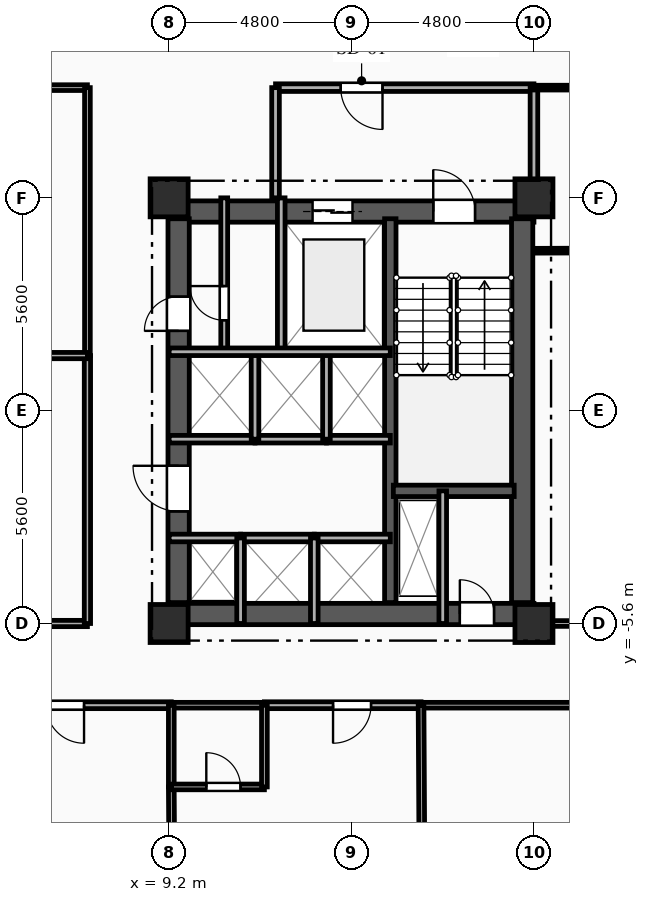
"""IFC4 building model, lengths in metres.
Left out: names, types, materials, properties, quantities, classifications, styles, units other than length and angle.
Written with IfcOpenShell. Run it as: python <this file> out.ifc"""

import sys

from ifc_helpers import new_model, si_unit, direction, frame, frame_2d, origin, origin_2d, place, context, subcontext, project, spatial, rectangle, extrude, element, fill, save


model = new_model("IFC4")
c1 = context("Model", 3, precision=1e-05, world=origin(), true_north=direction((0.0, 1.0)))
c2 = subcontext(c1, "Body", "Model", "MODEL_VIEW")
j1 = project(units=[si_unit("LENGTHUNIT", "METRE"), si_unit("PLANEANGLEUNIT", "RADIAN")], contexts=[c1])
p1 = place(None, origin())
s1 = spatial("IfcSite", under=j1, at=p1, CompositionType="ELEMENT")
p2 = place(p1, origin())
s2 = spatial("IfcBuilding", under=s1, at=p2, CompositionType="ELEMENT")
p3 = place(p2, frame((0.0, 0.0, 115.85)))
s3 = spatial("IfcBuildingStorey", under=s2, at=p3, CompositionType="ELEMENT", Elevation=115.85)
for number, where, z_axis, x_axis in (
    (1, (9.2, -5.6, 0.0), (0.0, 0.0, 1.0), (1.0, 0.0, 0.0)),
    (2, (9.2, 5.6, 0.0), (0.0, 0.0, 1.0), (1.0, 0.0, 0.0)),
    (3, (18.8, -5.6, 0.0), (0.0, 0.0, 1.0), (1.0, 0.0, 0.0)),
    (4, (18.8, 5.6, 0.0), (0.0, 0.0, 1.0), (1.0, 0.0, 0.0)),
):
    element("IfcColumn", number, at=place(p3, frame(where, z_axis=z_axis, x_axis=x_axis)), inside=s3, PredefinedType="COLUMN", context=c2, shape_type="SweptSolid", body=[
        extrude(rectangle(XDim=1.0, YDim=1.0, at=origin_2d()), origin(), (0.0, 0.0, 1.0), 3.35),
    ])
p4 = place(p3, frame((9.2, 5.24, 0.0), z_axis=(0.0, 0.0, 1.0), x_axis=(1.0, 0.0, 0.0)))
e5 = element("IfcWall", 5, at=p4, inside=s3, PredefinedType="SHEAR", context=c2, shape_type="SweptSolid", body=[
    extrude(rectangle(XDim=9.6, YDim=0.56, at=frame_2d((4.8, 0.0))), origin(), (0.0, 0.0, 1.0), 3.045),
])
p5 = place(p4, frame((6.95, 0.0, 0.0)))
e6 = element("IfcOpeningElement", 6, at=p5, cuts=e5, PredefinedType="OPENING", context=c2, shape_type="SweptSolid", body=[
    extrude(rectangle(XDim=1.1, YDim=2.15, at=frame_2d((0.55, 1.075))), frame((0.0, 0.29, 0.0), z_axis=(0.0, -1.0, 0.0), x_axis=(1.0, 0.0, 0.0)), (0.0, 0.0, 1.0), 0.58),
])
p6 = place(p4, frame((3.775, 0.0, 0.0)))
e7 = element("IfcOpeningElement", 7, at=p6, cuts=e5, PredefinedType="OPENING", context=c2, shape_type="SweptSolid", body=[
    extrude(rectangle(XDim=1.05, YDim=2.1, at=frame_2d((0.525, 1.05))), frame((0.0, 0.29, 0.0), z_axis=(0.0, -1.0, 0.0), x_axis=(1.0, 0.0, 0.0)), (0.0, 0.0, 1.0), 0.58),
])
p7 = place(p3, frame((9.2, -5.35, 0.0), z_axis=(0.0, 0.0, 1.0), x_axis=(1.0, 0.0, 0.0)))
e8 = element("IfcWall", 8, at=p7, inside=s3, PredefinedType="SHEAR", context=c2, shape_type="SweptSolid", body=[
    extrude(rectangle(XDim=9.6, YDim=0.56, at=frame_2d((4.8, 0.0))), origin(), (0.0, 0.0, 1.0), 3.045),
])
p8 = place(p7, frame((7.65, 0.0, 0.0)))
e9 = element("IfcOpeningElement", 9, at=p8, cuts=e8, PredefinedType="OPENING", context=c2, shape_type="SweptSolid", body=[
    extrude(rectangle(XDim=0.9, YDim=2.1, at=frame_2d((0.45, 1.05))), frame((0.0, 0.29, 0.0), z_axis=(0.0, -1.0, 0.0), x_axis=(1.0, 0.0, 0.0)), (0.0, 0.0, 1.0), 0.58),
])
p9 = place(p3, frame((9.45, -5.05, 0.0), z_axis=(0.0, 0.0, 1.0), x_axis=(0.0, 1.0, 0.0)))
e10 = element("IfcWall", 10, at=p9, inside=s3, PredefinedType="SHEAR", context=c2, shape_type="SweptSolid", body=[
    extrude(rectangle(XDim=10.1, YDim=0.56, at=frame_2d((5.05, 0.0))), origin(), (0.0, 0.0, 1.0), 3.045),
])
p10 = place(p9, frame((7.15, 0.0, 0.0)))
e11 = element("IfcOpeningElement", 11, at=p10, cuts=e10, PredefinedType="OPENING", context=c2, shape_type="SweptSolid", body=[
    extrude(rectangle(XDim=0.9, YDim=2.1, at=frame_2d((0.45, 1.05))), frame((0.0, 0.29, 0.0), z_axis=(0.0, -1.0, 0.0), x_axis=(1.0, 0.0, 0.0)), (0.0, 0.0, 1.0), 0.58),
])
p11 = place(p9, frame((2.4, 0.0, 0.0)))
e12 = element("IfcOpeningElement", 12, at=p11, cuts=e10, PredefinedType="OPENING", context=c2, shape_type="SweptSolid", body=[
    extrude(rectangle(XDim=1.2, YDim=2.15, at=frame_2d((0.6, 1.075))), frame((0.0, 0.29, 0.0), z_axis=(0.0, -1.0, 0.0), x_axis=(1.0, 0.0, 0.0)), (0.0, 0.0, 1.0), 0.58),
])
p12 = place(p3, frame((18.49, -5.05, 0.0), z_axis=(0.0, 0.0, 1.0), x_axis=(0.0, 1.0, 0.0)))
e13 = element("IfcWall", 13, at=p12, inside=s3, PredefinedType="SHEAR", context=c2, shape_type="SweptSolid", body=[
    extrude(rectangle(XDim=10.1, YDim=0.56, at=frame_2d((5.05, 0.0))), origin(), (0.0, 0.0, 1.0), 3.045),
])
p13 = place(p3, frame((15.02, -5.05, 0.0), z_axis=(0.0, 0.0, 1.0), x_axis=(0.0, 1.0, 0.0)))
e14 = element("IfcWall", 14, at=p13, inside=s3, PredefinedType="SHEAR", context=c2, shape_type="SweptSolid", body=[
    extrude(rectangle(XDim=10.1, YDim=0.3, at=frame_2d((5.05, 0.0))), origin(), (0.0, 0.0, 1.0), 3.045),
])
p14 = place(p3, frame((15.1, -2.11, 0.0), z_axis=(0.0, 0.0, 1.0), x_axis=(1.0, 0.0, 0.0)))
e15 = element("IfcWall", 15, at=p14, inside=s3, PredefinedType="SHEAR", context=c2, shape_type="SweptSolid", body=[
    extrude(rectangle(XDim=3.18, YDim=0.3, at=frame_2d((1.59, 0.0))), origin(), (0.0, 0.0, 1.0), 3.045),
])
p15 = place(p3, frame((16.4, -2.11, 0.0), z_axis=(0.0, 0.0, 1.0), x_axis=(0.0, -1.0, 0.0)))
e16 = element("IfcWall", 16, at=p15, inside=s3, PredefinedType="PARTITIONING", context=c2, shape_type="SweptSolid", body=[
    extrude(rectangle(XDim=3.49, YDim=0.2, at=frame_2d((1.745, 0.0))), origin(), (0.0, 0.0, 1.0), 3.045),
])
p16 = place(p3, frame((12.15, 5.6, 0.0), z_axis=(0.0, 0.0, 1.0), x_axis=(0.0, -1.0, 0.0)))
e17 = element("IfcWall", 17, at=p16, inside=s3, PredefinedType="PARTITIONING", context=c2, shape_type="SweptSolid", body=[
    extrude(rectangle(XDim=4.05, YDim=0.2, at=frame_2d((2.025, 0.0))), origin(), (0.0, 0.0, 1.0), 3.045),
])
p17 = place(p3, frame((18.8, 8.5, 0.0), z_axis=(0.0, 0.0, 1.0), x_axis=(-1.0, 0.0, 0.0)))
e18 = element("IfcWall", 18, at=p17, inside=s3, PredefinedType="PARTITIONING", context=c2, shape_type="SweptSolid", body=[
    extrude(rectangle(XDim=6.8, YDim=0.2, at=frame_2d((3.4, 0.0))), origin(), (0.0, 0.0, 1.0), 3.045),
])
p18 = place(p17, frame((3.985, 0.0, 0.0)))
e19 = element("IfcOpeningElement", 19, at=p18, cuts=e18, PredefinedType="OPENING", context=c2, shape_type="SweptSolid", body=[
    extrude(rectangle(XDim=1.1, YDim=2.15, at=frame_2d((0.55, 1.075))), frame((0.0, 0.11, 0.0), z_axis=(0.0, -1.0, 0.0), x_axis=(1.0, 0.0, 0.0)), (0.0, 0.0, 1.0), 0.22),
])
p19 = place(p3, frame((12.0, 8.5, 0.0), z_axis=(0.0, 0.0, 1.0), x_axis=(0.0, -1.0, 0.0)))
e20 = element("IfcWall", 20, at=p19, inside=s3, PredefinedType="PARTITIONING", context=c2, shape_type="SweptSolid", body=[
    extrude(rectangle(XDim=2.9, YDim=0.2, at=frame_2d((1.45, 0.0))), origin(), (0.0, 0.0, 1.0), 3.045),
])
p20 = place(p3, frame((18.8, 5.6, 0.0), z_axis=(0.0, 0.0, 1.0), x_axis=(0.0, 1.0, 0.0)))
e21 = element("IfcWall", 21, at=p20, inside=s3, PredefinedType="PARTITIONING", context=c2, shape_type="SweptSolid", body=[
    extrude(rectangle(XDim=2.9, YDim=0.2, at=frame_2d((1.45, 0.0))), origin(), (0.0, 0.0, 1.0), 2.53),
])
p21 = place(p3, frame((10.65, 1.55, 0.0), z_axis=(0.0, 0.0, 1.0), x_axis=(0.0, 1.0, 0.0)))
e22 = element("IfcWall", 22, at=p21, inside=s3, PredefinedType="PARTITIONING", context=c2, shape_type="SweptSolid", body=[
    extrude(rectangle(XDim=4.05, YDim=0.18, at=frame_2d((2.025, 0.0))), origin(), (0.0, 0.0, 1.0), 3.045),
])
p22 = place(p21, frame((0.829, 0.0, 0.0)))
e23 = element("IfcOpeningElement", 23, at=p22, cuts=e22, PredefinedType="OPENING", context=c2, shape_type="SweptSolid", body=[
    extrude(rectangle(XDim=0.9, YDim=2.1, at=frame_2d((0.45, 1.05))), frame((0.0, 0.1, 0.0), z_axis=(0.0, -1.0, 0.0), x_axis=(1.0, 0.0, 0.0)), (0.0, 0.0, 1.0), 0.2),
])
p23 = place(p3, frame((9.2, -3.35, 0.0), z_axis=(0.0, 0.0, 1.0), x_axis=(1.0, 0.0, 0.0)))
e24 = element("IfcWall", 24, at=p23, inside=s3, PredefinedType="PARTITIONING", context=c2, shape_type="SweptSolid", body=[
    extrude(rectangle(XDim=1.88, YDim=0.2, at=frame_2d((0.94, 0.0))), origin(), (0.0, 0.0, 1.0), 2.76),
])
p24 = place(p3, frame((11.08, -3.35, 0.0), z_axis=(0.0, 0.0, 1.0), x_axis=(1.0, 0.0, 0.0)))
e25 = element("IfcWall", 25, at=p24, inside=s3, PredefinedType="PARTITIONING", context=c2, shape_type="SweptSolid", body=[
    extrude(rectangle(XDim=1.94, YDim=0.2, at=frame_2d((0.97, 0.0))), origin(), (0.0, 0.0, 1.0), 3.045),
])
p25 = place(p3, frame((13.02, -3.35, 0.0), z_axis=(0.0, 0.0, 1.0), x_axis=(1.0, 0.0, 0.0)))
e26 = element("IfcWall", 26, at=p25, inside=s3, PredefinedType="PARTITIONING", context=c2, shape_type="SweptSolid", body=[
    extrude(rectangle(XDim=2.0, YDim=0.2, at=frame_2d((1.0, 0.0))), origin(), (0.0, 0.0, 1.0), 3.045),
])
p26 = place(p3, frame((11.46, -0.75, 0.0), z_axis=(0.0, 0.0, 1.0), x_axis=(-1.0, 0.0, 0.0)))
e27 = element("IfcWall", 27, at=p26, inside=s3, PredefinedType="PARTITIONING", context=c2, shape_type="SweptSolid", body=[
    extrude(rectangle(XDim=2.26, YDim=0.2, at=frame_2d((1.13, 0.0))), origin(), (0.0, 0.0, 1.0), 3.045),
])
p27 = place(p3, frame((13.34, -0.75, 0.0), z_axis=(0.0, 0.0, 1.0), x_axis=(-1.0, 0.0, 0.0)))
e28 = element("IfcWall", 28, at=p27, inside=s3, PredefinedType="PARTITIONING", context=c2, shape_type="SweptSolid", body=[
    extrude(rectangle(XDim=1.88, YDim=0.2, at=frame_2d((0.94, 0.0))), origin(), (0.0, 0.0, 1.0), 3.045),
])
p28 = place(p3, frame((15.02, -0.75, 0.0), z_axis=(0.0, 0.0, 1.0), x_axis=(-1.0, 0.0, 0.0)))
e29 = element("IfcWall", 29, at=p28, inside=s3, PredefinedType="PARTITIONING", context=c2, shape_type="SweptSolid", body=[
    extrude(rectangle(XDim=1.68, YDim=0.2, at=frame_2d((0.84, 0.0))), origin(), (0.0, 0.0, 1.0), 3.045),
])
for number, where, z_axis, x_axis in (
    (30, (11.08, -5.6, 0.0), (0.0, 0.0, 1.0), (0.0, 1.0, 0.0)),
    (31, (13.02, -5.6, 0.0), (0.0, 0.0, 1.0), (0.0, 1.0, 0.0)),
):
    element("IfcWall", number, at=place(p3, frame(where, z_axis=z_axis, x_axis=x_axis)), inside=s3, PredefinedType="PARTITIONING", context=c2, shape_type="SweptSolid", body=[
        extrude(rectangle(XDim=2.25, YDim=0.2, at=frame_2d((1.125, 0.0))), origin(), (0.0, 0.0, 1.0), 3.045),
    ])
for number, where, z_axis, x_axis in (
    (32, (11.46, -0.75, 0.0), (0.0, 0.0, 1.0), (0.0, 1.0, 0.0)),
    (33, (13.34, -0.75, 0.0), (0.0, 0.0, 1.0), (0.0, 1.0, 0.0)),
):
    element("IfcWall", number, at=place(p3, frame(where, z_axis=z_axis, x_axis=x_axis)), inside=s3, PredefinedType="PARTITIONING", context=c2, shape_type="SweptSolid", body=[
        extrude(rectangle(XDim=2.3, YDim=0.2, at=frame_2d((1.15, 0.0))), origin(), (0.0, 0.0, 1.0), 3.045),
    ])
p29 = place(p3, frame((23.0, 8.5, 0.0), z_axis=(0.0, 0.0, 1.0), x_axis=(-1.0, 0.0, 0.0)))
e34 = element("IfcWall", 34, at=p29, inside=s3, PredefinedType="PARTITIONING", context=c2, shape_type="SweptSolid", body=[
    extrude(rectangle(XDim=4.2, YDim=0.125, at=frame_2d((2.1, 0.0))), origin(), (0.0, 0.0, 1.0), 3.045),
])
p30 = place(p29, frame((0.841, 0.0, 0.0)))
e35 = element("IfcOpeningElement", 35, at=p30, cuts=e34, PredefinedType="OPENING", context=c2, shape_type="SweptSolid", body=[
    extrude(rectangle(XDim=0.95, YDim=2.1, at=frame_2d((0.475, 1.05))), frame((0.0, 0.073, 0.0), z_axis=(0.0, -1.0, 0.0), x_axis=(1.0, 0.0, 0.0)), (0.0, 0.0, 1.0), 0.145),
])
p31 = place(p3, frame((7.05, 8.5, 0.0), z_axis=(0.0, 0.0, 1.0), x_axis=(-1.0, 0.0, 0.0)))
e36 = element("IfcWall", 36, at=p31, inside=s3, PredefinedType="PARTITIONING", context=c2, shape_type="SweptSolid", body=[
    extrude(rectangle(XDim=7.05, YDim=0.15, at=frame_2d((3.525, 0.0))), origin(), (0.0, 0.0, 1.0), 3.045),
])
p32 = place(p3, frame((18.8, -5.6, 0.0), z_axis=(0.0, 0.0, 1.0), x_axis=(1.0, 0.0, 0.0)))
e37 = element("IfcWall", 37, at=p32, inside=s3, PredefinedType="PARTITIONING", context=c2, shape_type="SweptSolid", body=[
    extrude(rectangle(XDim=4.2, YDim=0.15, at=frame_2d((2.1, 0.0))), origin(), (0.0, 0.0, 1.0), 2.53),
])
p33 = place(p32, frame((2.321, 0.0, 0.0)))
e38 = element("IfcOpeningElement", 38, at=p33, cuts=e37, PredefinedType="OPENING", context=c2, shape_type="SweptSolid", body=[
    extrude(rectangle(XDim=1.05, YDim=2.15, at=frame_2d((0.525, 1.075))), frame((0.0, 0.085, 0.0), z_axis=(0.0, -1.0, 0.0), x_axis=(1.0, 0.0, 0.0)), (0.0, 0.0, 1.0), 0.17),
])
p34 = place(p3, frame((9.257, -7.75, 0.0), z_axis=(0.0, 0.0, 1.0), x_axis=(-1.0, 0.0, 0.0)))
e39 = element("IfcWall", 39, at=p34, inside=s3, PredefinedType="PARTITIONING", context=c2, shape_type="SweptSolid", body=[
    extrude(rectangle(XDim=4.121, YDim=0.18, at=frame_2d((2.061, 0.0))), origin(), (0.0, 0.0, 1.0), 3.045),
])
p35 = place(p34, frame((2.296, 0.0, 0.0)))
e40 = element("IfcOpeningElement", 40, at=p35, cuts=e39, PredefinedType="OPENING", context=c2, shape_type="SweptSolid", body=[
    extrude(rectangle(XDim=1.0, YDim=2.15, at=frame_2d((0.5, 1.075))), frame((0.0, 0.1, 0.0), z_axis=(0.0, -1.0, 0.0), x_axis=(1.0, 0.0, 0.0)), (0.0, 0.0, 1.0), 0.2),
])
p36 = place(p3, frame((15.829, -7.75, 0.0), z_axis=(0.0, 0.0, 1.0), x_axis=(-1.0, 0.0, 0.0)))
e41 = element("IfcWall", 41, at=p36, inside=s3, PredefinedType="PARTITIONING", context=c2, shape_type="SweptSolid", body=[
    extrude(rectangle(XDim=4.122, YDim=0.18, at=frame_2d((2.061, 0.0))), origin(), (0.0, 0.0, 1.0), 3.045),
])
p37 = place(p36, frame((1.316, 0.0, 0.0)))
e42 = element("IfcOpeningElement", 42, at=p37, cuts=e41, PredefinedType="OPENING", context=c2, shape_type="SweptSolid", body=[
    extrude(rectangle(XDim=1.0, YDim=2.15, at=frame_2d((0.5, 1.075))), frame((0.0, 0.1, 0.0), z_axis=(0.0, -1.0, 0.0), x_axis=(1.0, 0.0, 0.0)), (0.0, 0.0, 1.0), 0.2),
])
p38 = place(p3, frame((11.707, -7.75, 0.0), z_axis=(0.0, 0.0, 1.0), x_axis=(-1.0, 0.0, 0.0)))
e43 = element("IfcWall", 43, at=p38, inside=s3, PredefinedType="PLUMBINGWALL", context=c2, shape_type="SweptSolid", body=[
    extrude(rectangle(XDim=2.45, YDim=0.15, at=frame_2d((1.225, 0.0))), origin(), (0.0, 0.0, 1.0), 3.045),
])
p39 = place(p3, frame((23.0, -7.75, 0.0), z_axis=(0.0, 0.0, 1.0), x_axis=(-1.0, 0.0, 0.0)))
e44 = element("IfcWall", 44, at=p39, inside=s3, PredefinedType="PARTITIONING", context=c2, shape_type="SweptSolid", body=[
    extrude(rectangle(XDim=7.171, YDim=0.15, at=frame_2d((3.585, 0.0))), origin(), (0.0, 0.0, 1.0), 3.045),
])
p40 = place(p39, frame((1.2, 0.0, 0.0)))
e45 = element("IfcOpeningElement", 45, at=p40, cuts=e44, PredefinedType="OPENING", context=c2, shape_type="SweptSolid", body=[
    extrude(rectangle(XDim=1.05, YDim=2.15, at=frame_2d((0.525, 1.075))), frame((0.0, 0.085, 0.0), z_axis=(0.0, -1.0, 0.0), x_axis=(1.0, 0.0, 0.0)), (0.0, 0.0, 1.0), 0.17),
])
p41 = place(p3, frame((0.0, -5.6, 0.0), z_axis=(0.0, 0.0, 1.0), x_axis=(1.0, 0.0, 0.0)))
e46 = element("IfcWall", 46, at=p41, inside=s3, PredefinedType="PARTITIONING", context=c2, shape_type="SweptSolid", body=[
    extrude(rectangle(XDim=7.05, YDim=0.165, at=frame_2d((3.525, 0.0))), origin(), (0.0, 0.0, 1.0), 2.53),
])
p42 = place(p3, frame((7.05, -5.6, 0.0), z_axis=(0.0, 0.0, 1.0), x_axis=(0.0, 1.0, 0.0)))
e47 = element("IfcWall", 47, at=p42, inside=s3, PredefinedType="PARTITIONING", context=c2, shape_type="SweptSolid", body=[
    extrude(rectangle(XDim=7.05, YDim=0.165, at=frame_2d((3.525, 0.0))), origin(), (0.0, 0.0, 1.0), 3.045),
])
p43 = place(p3, frame((7.05, 1.45, 0.0), z_axis=(0.0, 0.0, 1.0), x_axis=(0.0, 1.0, 0.0)))
e48 = element("IfcWall", 48, at=p43, inside=s3, PredefinedType="PARTITIONING", context=c2, shape_type="SweptSolid", body=[
    extrude(rectangle(XDim=7.05, YDim=0.15, at=frame_2d((3.525, 0.0))), origin(), (0.0, 0.0, 1.0), 3.045),
])
p44 = place(p3, frame((18.8, 4.208, 0.0), z_axis=(0.0, 0.0, 1.0), x_axis=(0.9999942944, 0.003378042094, 0.0)))
e49 = element("IfcWall", 49, at=p44, inside=s3, PredefinedType="PARTITIONING", context=c2, shape_type="SweptSolid", body=[
    extrude(rectangle(XDim=13.009, YDim=0.125, at=frame_2d((6.504, 0.0))), origin(), (0.0, 0.0, 1.0), 3.045),
])
p45 = place(p3, frame((9.257, -9.9, 0.0), z_axis=(0.0, 0.0, 1.0), x_axis=(0.006943468909, -0.999975893829, 0.0)))
e50 = element("IfcWall", 50, at=p45, inside=s3, PredefinedType="PARTITIONING", context=c2, shape_type="SweptSolid", body=[
    extrude(rectangle(XDim=6.294, YDim=0.15, at=frame_2d((3.147, 0.0))), origin(), (0.0, 0.0, 1.0), 3.045),
])
p46 = place(p3, frame((9.257, -7.75, 0.0), z_axis=(0.0, 0.0, 1.0), x_axis=(0.0, -1.0, 0.0)))
e51 = element("IfcWall", 51, at=p46, inside=s3, PredefinedType="PLUMBINGWALL", context=c2, shape_type="SweptSolid", body=[
    extrude(rectangle(XDim=2.15, YDim=0.15, at=frame_2d((1.075, 0.0))), origin(), (0.0, 0.0, 1.0), 3.045),
])
p47 = place(p3, frame((9.257, -9.9, 0.0), z_axis=(0.0, 0.0, 1.0), x_axis=(1.0, 0.0, 0.0)))
e52 = element("IfcWall", 52, at=p47, inside=s3, PredefinedType="PLUMBINGWALL", context=c2, shape_type="SweptSolid", body=[
    extrude(rectangle(XDim=2.45, YDim=0.15, at=frame_2d((1.225, 0.0))), origin(), (0.0, 0.0, 1.0), 3.045),
])
p48 = place(p47, frame((0.921, 0.0, 0.0)))
e53 = element("IfcOpeningElement", 53, at=p48, cuts=e52, PredefinedType="OPENING", context=c2, shape_type="SweptSolid", body=[
    extrude(rectangle(XDim=0.9, YDim=2.1, at=frame_2d((0.45, 1.05))), frame((0.0, 0.085, 0.0), z_axis=(0.0, -1.0, 0.0), x_axis=(1.0, 0.0, 0.0)), (0.0, 0.0, 1.0), 0.17),
])
p49 = place(p3, frame((11.707, -9.9, 0.0), z_axis=(0.0, 0.0, 1.0), x_axis=(0.0, 1.0, 0.0)))
e54 = element("IfcWall", 54, at=p49, inside=s3, PredefinedType="PLUMBINGWALL", context=c2, shape_type="SweptSolid", body=[
    extrude(rectangle(XDim=2.15, YDim=0.15, at=frame_2d((1.075, 0.0))), origin(), (0.0, 0.0, 1.0), 3.045),
])
p50 = place(p3, frame((15.829, -7.75, 0.0), z_axis=(0.0, 0.0, 1.0), x_axis=(0.00563681802, -0.999984113015, 0.0)))
e55 = element("IfcWall", 55, at=p50, inside=s3, PredefinedType="PARTITIONING", context=c2, shape_type="SweptSolid", body=[
    extrude(rectangle(XDim=7.753, YDim=0.15, at=frame_2d((3.876, 0.0))), origin(), (0.0, 0.0, 1.0), 3.045),
])
p51 = place(p3, frame((-7.05, 1.45, 0.0), z_axis=(0.0, 0.0, 1.0), x_axis=(1.0, 0.0, 0.0)))
e56 = element("IfcWall", 56, at=p51, inside=s3, PredefinedType="PARTITIONING", context=c2, shape_type="SweptSolid", body=[
    extrude(rectangle(XDim=14.1, YDim=0.165, at=frame_2d((7.05, 0.0))), origin(), (0.0, 0.0, 1.0), 3.045),
])
p52 = place(p3, frame((9.2, 1.55, 0.0), z_axis=(0.0, 0.0, 1.0), x_axis=(1.0, 0.0, 0.0)))
e57 = element("IfcWall", 57, at=p52, inside=s3, PredefinedType="PARTITIONING", context=c2, shape_type="SweptSolid", body=[
    extrude(rectangle(XDim=5.82, YDim=0.2, at=frame_2d((2.91, 0.0))), origin(), (0.0, 0.0, 1.0), 3.045),
])
p53 = place(p5, origin())
e58 = element("IfcDoor", 58, at=p53, inside=s3, OperationType="SINGLE_SWING_LEFT", PredefinedType="DOOR", context=c2, shape_type="SweptSolid", body=[
    extrude(rectangle(XDim=1.1, YDim=2.15, at=frame_2d((0.55, 1.075))), frame((0.0, 0.025, 0.0), z_axis=(0.0, -1.0, 0.0), x_axis=(1.0, 0.0, 0.0)), (0.0, 0.0, 1.0), 0.05),
])
fill(e6, e58)
p54 = place(p6, origin())
e59 = element("IfcDoor", 59, at=p54, inside=s3, OperationType="DOUBLE_DOOR_SLIDING", PredefinedType="DOOR", context=c2, shape_type="SweptSolid", body=[
    extrude(rectangle(XDim=1.05, YDim=2.1, at=frame_2d((0.525, 1.05))), frame((0.0, 0.025, 0.0), z_axis=(0.0, -1.0, 0.0), x_axis=(1.0, 0.0, 0.0)), (0.0, 0.0, 1.0), 0.05),
])
fill(e7, e59)
p55 = place(p8, origin())
e60 = element("IfcDoor", 60, at=p55, inside=s3, OperationType="SINGLE_SWING_LEFT", PredefinedType="DOOR", context=c2, shape_type="SweptSolid", body=[
    extrude(rectangle(XDim=0.9, YDim=2.1, at=frame_2d((0.45, 1.05))), frame((0.0, 0.025, 0.0), z_axis=(0.0, -1.0, 0.0), x_axis=(1.0, 0.0, 0.0)), (0.0, 0.0, 1.0), 0.05),
])
fill(e9, e60)
p56 = place(p18, origin())
e61 = element("IfcDoor", 61, at=p56, inside=s3, OperationType="SINGLE_SWING_LEFT", PredefinedType="DOOR", context=c2, shape_type="SweptSolid", body=[
    extrude(rectangle(XDim=1.1, YDim=2.15, at=frame_2d((0.55, 1.075))), frame((0.0, 0.025, 0.0), z_axis=(0.0, -1.0, 0.0), x_axis=(1.0, 0.0, 0.0)), (0.0, 0.0, 1.0), 0.05),
])
fill(e19, e61)
p57 = place(p22, origin())
e62 = element("IfcDoor", 62, at=p57, inside=s3, OperationType="SINGLE_SWING_RIGHT", PredefinedType="DOOR", context=c2, shape_type="SweptSolid", body=[
    extrude(rectangle(XDim=0.9, YDim=2.1, at=frame_2d((0.45, 1.05))), frame((0.0, 0.025, 0.0), z_axis=(0.0, -1.0, 0.0), x_axis=(1.0, 0.0, 0.0)), (0.0, 0.0, 1.0), 0.05),
])
fill(e23, e62)
p58 = place(p10, origin())
e63 = element("IfcDoor", 63, at=p58, inside=s3, OperationType="SINGLE_SWING_LEFT", PredefinedType="DOOR", context=c2, shape_type="SweptSolid", body=[
    extrude(rectangle(XDim=0.9, YDim=2.1, at=frame_2d((0.45, 1.05))), frame((0.0, 0.025, 0.0), z_axis=(0.0, -1.0, 0.0), x_axis=(1.0, 0.0, 0.0)), (0.0, 0.0, 1.0), 0.05),
])
fill(e11, e63)
p59 = place(p11, origin())
e64 = element("IfcDoor", 64, at=p59, inside=s3, OperationType="SINGLE_SWING_RIGHT", PredefinedType="DOOR", context=c2, shape_type="SweptSolid", body=[
    extrude(rectangle(XDim=1.2, YDim=2.15, at=frame_2d((0.6, 1.075))), frame((0.0, 0.025, 0.0), z_axis=(0.0, -1.0, 0.0), x_axis=(1.0, 0.0, 0.0)), (0.0, 0.0, 1.0), 0.05),
])
fill(e12, e64)
p60 = place(p35, origin())
e65 = element("IfcDoor", 65, at=p60, inside=s3, OperationType="SINGLE_SWING_LEFT", PredefinedType="DOOR", context=c2, shape_type="SweptSolid", body=[
    extrude(rectangle(XDim=1.0, YDim=2.15, at=frame_2d((0.5, 1.075))), frame((0.0, 0.025, 0.0), z_axis=(0.0, -1.0, 0.0), x_axis=(1.0, 0.0, 0.0)), (0.0, 0.0, 1.0), 0.05),
])
fill(e40, e65)
p61 = place(p37, origin())
e66 = element("IfcDoor", 66, at=p61, inside=s3, OperationType="SINGLE_SWING_RIGHT", PredefinedType="DOOR", context=c2, shape_type="SweptSolid", body=[
    extrude(rectangle(XDim=1.0, YDim=2.15, at=frame_2d((0.5, 1.075))), frame((0.0, 0.025, 0.0), z_axis=(0.0, -1.0, 0.0), x_axis=(1.0, 0.0, 0.0)), (0.0, 0.0, 1.0), 0.05),
])
fill(e42, e66)
p62 = place(p48, origin())
e67 = element("IfcDoor", 67, at=p62, inside=s3, OperationType="SINGLE_SWING_LEFT", PredefinedType="DOOR", context=c2, shape_type="SweptSolid", body=[
    extrude(rectangle(XDim=0.9, YDim=2.1, at=frame_2d((0.45, 1.05))), frame((0.0, 0.025, 0.0), z_axis=(0.0, -1.0, 0.0), x_axis=(1.0, 0.0, 0.0)), (0.0, 0.0, 1.0), 0.05),
])
fill(e53, e67)
save(model, sys.argv[1])
